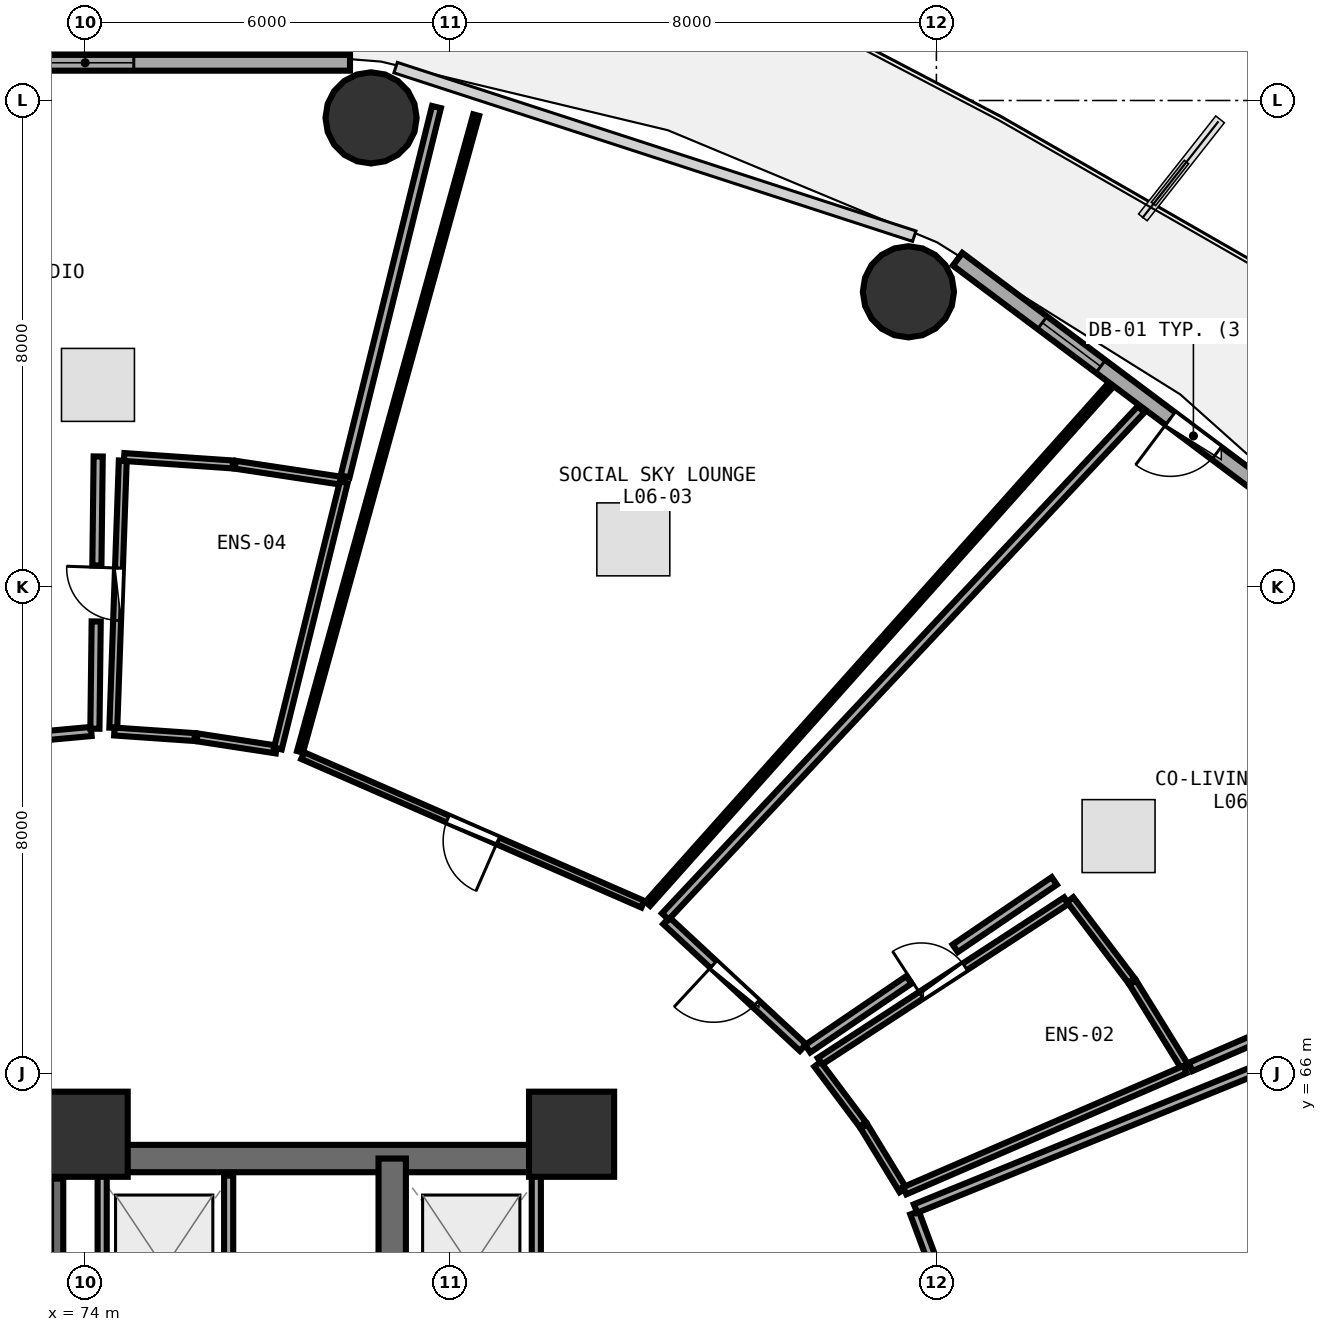
"""IFC4 building model, lengths in metres.
Left out: names, types, materials, properties, quantities, classifications, styles, units other than length and angle.
Written with IfcOpenShell. Run it as: python <this file> out.ifc"""

import sys

from ifc_helpers import new_model, si_unit, direction, frame, frame_2d, origin, origin_2d, place, context, subcontext, project, spatial, rectangle, circle, extrude, element, fill, save


model = new_model("IFC4")
c1 = context("Model", 3, precision=1e-05, world=origin(), true_north=direction((0.0, 1.0)))
c2 = subcontext(c1, "Body", "Model", "MODEL_VIEW")
j1 = project(units=[si_unit("LENGTHUNIT", "METRE"), si_unit("PLANEANGLEUNIT", "RADIAN")], contexts=[c1])
p1 = place(None, origin())
s1 = spatial("IfcSite", under=j1, at=p1, CompositionType="ELEMENT")
p2 = place(p1, origin())
s2 = spatial("IfcBuilding", under=s1, at=p2, CompositionType="ELEMENT")
p3 = place(p2, frame((0.0, 0.0, 26.25)))
s3 = spatial("IfcBuildingStorey", under=s2, at=p3, CompositionType="ELEMENT", Elevation=26.25)
for number, where, z_axis, x_axis in (
    (1, (82.0, 65.0, 0.0), (0.0, 0.0, 1.0), (1.0, 0.0, 0.0)),
    (2, (74.0, 65.0, 0.0), (0.0, 0.0, 1.0), (1.0, 0.0, 0.0)),
):
    element("IfcColumn", number, at=place(p3, frame(where, z_axis=z_axis, x_axis=x_axis)), inside=s3, PredefinedType="PILASTER", context=c2, shape_type="SweptSolid", body=[
        extrude(rectangle(XDim=1.4, YDim=1.4, at=origin_2d()), origin(), (0.0, 0.0, 1.0), 3.75),
    ])
for number, where, z_axis, x_axis in (
    (3, (87.54, 78.854, 0.0), (0.0, 0.0, 1.0), (1.0, 0.0, 0.0)),
    (4, (78.702, 81.714, 0.0), (0.0, 0.0, 1.0), (1.0, 0.0, 0.0)),
):
    element("IfcColumn", number, at=place(p3, frame(where, z_axis=z_axis, x_axis=x_axis)), inside=s3, PredefinedType="COLUMN", context=c2, shape_type="SweptSolid", body=[
        extrude(circle(Radius=0.75, at=origin_2d()), origin(), (0.0, 0.0, 1.0), 3.75),
    ])
p4 = place(p3, frame((94.984, 74.418, 0.0), z_axis=(0.0, 0.0, 1.0), x_axis=(-0.80030733173, 0.599590005569, 0.0)))
e5 = element("IfcWall", 5, at=p4, inside=s3, PredefinedType="SOLIDWALL", context=c2, shape_type="SweptSolid", body=[
    extrude(rectangle(XDim=8.291, YDim=0.26, at=frame_2d((4.145, 0.0))), origin(), (0.0, 0.0, 1.0), 3.475),
])
p5 = place(p4, frame((2.97, 0.0, 0.0)))
e6 = element("IfcOpeningElement", 6, at=p5, cuts=e5, PredefinedType="OPENING", context=c2, shape_type="SweptSolid", body=[
    extrude(rectangle(XDim=0.95, YDim=2.1, at=frame_2d((0.475, 1.05))), frame((0.0, 0.14, 0.0), z_axis=(0.0, -1.0, 0.0), x_axis=(1.0, 0.0, 0.0)), (0.0, 0.0, 1.0), 0.28),
])
p6 = place(p4, frame((5.35, 0.0, 0.85)))
e7 = element("IfcOpeningElement", 7, at=p6, cuts=e5, PredefinedType="OPENING", context=c2, shape_type="SweptSolid", body=[
    extrude(rectangle(XDim=1.2, YDim=1.45, at=frame_2d((0.6, 0.725))), frame((0.0, 0.14, 0.0), z_axis=(0.0, -1.0, 0.0), x_axis=(1.0, 0.0, 0.0)), (0.0, 0.0, 1.0), 0.28),
])
p7 = place(p3, frame((78.356, 82.62, 0.0), z_axis=(0.0, 0.0, 1.0), x_axis=(-1.0, 0.0, 0.0)))
e8 = element("IfcWall", 8, at=p7, inside=s3, PredefinedType="SOLIDWALL", context=c2, shape_type="SweptSolid", body=[
    extrude(rectangle(XDim=8.712, YDim=0.26, at=frame_2d((4.356, 0.0))), origin(), (0.0, 0.0, 1.0), 3.475),
])
p8 = place(p7, frame((3.556, 0.0, 0.85)))
e9 = element("IfcOpeningElement", 9, at=p8, cuts=e8, PredefinedType="OPENING", context=c2, shape_type="SweptSolid", body=[
    extrude(rectangle(XDim=1.6, YDim=1.45, at=frame_2d((0.8, 0.725))), frame((0.0, 0.14, 0.0), z_axis=(0.0, -1.0, 0.0), x_axis=(1.0, 0.0, 0.0)), (0.0, 0.0, 1.0), 0.28),
])
p9 = place(p3, frame((73.54, 61.2, 0.0), z_axis=(0.0, 0.0, 1.0), x_axis=(0.0, 1.0, 0.0)))
e10 = element("IfcWall", 10, at=p9, inside=s3, PredefinedType="SHEAR", context=c2, shape_type="SweptSolid", body=[
    extrude(rectangle(XDim=3.07, YDim=0.2, at=frame_2d((1.535, 0.0))), origin(), (0.0, 0.0, 1.0), 3.49),
])
p10 = place(p3, frame((74.0, 64.6, 0.0), z_axis=(0.0, 0.0, 1.0), x_axis=(1.0, 0.0, 0.0)))
e11 = element("IfcWall", 11, at=p10, inside=s3, PredefinedType="SHEAR", context=c2, shape_type="SweptSolid", body=[
    extrude(rectangle(XDim=8.0, YDim=0.45, at=frame_2d((4.0, 0.0))), origin(), (0.0, 0.0, 1.0), 3.49),
])
p11 = place(p3, frame((79.05, 58.3, 0.0), z_axis=(0.0, 0.0, 1.0), x_axis=(0.0, 1.0, 0.0)))
e12 = element("IfcWall", 12, at=p11, inside=s3, PredefinedType="SHEAR", context=c2, shape_type="SweptSolid", body=[
    extrude(rectangle(XDim=6.3, YDim=0.45, at=frame_2d((3.15, 0.0))), origin(), (0.0, 0.0, 1.0), 3.49),
])
p12 = place(p3, frame((74.28, 61.35, 0.0), z_axis=(0.0, 0.0, 1.0), x_axis=(0.0, 1.0, 0.0)))
e13 = element("IfcWall", 13, at=p12, inside=s3, PredefinedType="PARTITIONING", context=c2, shape_type="SweptSolid", body=[
    extrude(rectangle(XDim=2.97, YDim=0.15, at=frame_2d((1.485, 0.0))), origin(), (0.0, 0.0, 1.0), 3.48),
])
for number, where, z_axis, x_axis in (
    (14, (76.36, 61.48, 0.0), (0.0, 0.0, 1.0), (0.0, 1.0, 0.0)),
    (15, (81.42, 61.48, 0.0), (0.0, 0.0, 1.0), (0.0, 1.0, 0.0)),
):
    element("IfcWall", number, at=place(p3, frame(where, z_axis=z_axis, x_axis=x_axis)), inside=s3, PredefinedType="PARTITIONING", context=c2, shape_type="SweptSolid", body=[
        extrude(rectangle(XDim=2.84, YDim=0.15, at=frame_2d((1.42, 0.0))), origin(), (0.0, 0.0, 1.0), 3.48),
    ])
p13 = place(p3, frame((88.667, 60.948, 0.0), z_axis=(0.0, 0.0, 1.0), x_axis=(-0.348640514247, 0.937256524024, 0.0)))
e16 = element("IfcWall", 16, at=p13, inside=s3, PredefinedType="PARTITIONING", context=c2, shape_type="SweptSolid", body=[
    extrude(rectangle(XDim=2.943, YDim=0.15, at=frame_2d((1.472, 0.0))), origin(), (0.0, 0.0, 1.0), 3.48),
])
p14 = place(p13, frame((0.997, 0.0, 0.0)))
e17 = element("IfcOpeningElement", 17, at=p14, cuts=e16, PredefinedType="OPENING", context=c2, shape_type="SweptSolid", body=[
    extrude(rectangle(XDim=0.95, YDim=2.08, at=frame_2d((0.475, 1.04))), frame((0.0, 0.085, 0.0), z_axis=(0.0, -1.0, 0.0), x_axis=(1.0, 0.0, 0.0)), (0.0, 0.0, 1.0), 0.17),
])
p15 = place(p3, frame((86.083, 66.2, 0.0), z_axis=(0.0, 0.0, 1.0), x_axis=(0.837796261941, 0.545982988267, 0.0)))
e18 = element("IfcWall", 18, at=p15, inside=s3, PredefinedType="PLUMBINGWALL", context=c2, shape_type="SweptSolid", body=[
    extrude(rectangle(XDim=4.838, YDim=0.13, at=frame_2d((2.419, 0.0))), origin(), (0.0, 0.0, 1.0), 3.235),
])
p16 = place(p15, frame((1.989, 0.0, 0.0)))
e19 = element("IfcOpeningElement", 19, at=p16, cuts=e18, PredefinedType="OPENING", context=c2, shape_type="SweptSolid", body=[
    extrude(rectangle(XDim=0.86, YDim=2.05, at=frame_2d((0.43, 1.025))), frame((0.0, 0.075, 0.0), z_axis=(0.0, -1.0, 0.0), x_axis=(1.0, 0.0, 0.0)), (0.0, 0.0, 1.0), 0.15),
])
p17 = place(p3, frame((85.806, 66.425, 0.0), z_axis=(0.0, 0.0, 1.0), x_axis=(-0.7329267348, 0.680307578538, 0.0)))
e20 = element("IfcWall", 20, at=p17, inside=s3, PredefinedType="PARTITIONING", context=c2, shape_type="SweptSolid", body=[
    extrude(rectangle(XDim=3.067, YDim=0.15, at=frame_2d((1.533, 0.0))), origin(), (0.0, 0.0, 1.0), 2.875),
])
p18 = place(p17, frame((1.059, 0.0, 0.0)))
e21 = element("IfcOpeningElement", 21, at=p18, cuts=e20, PredefinedType="OPENING", context=c2, shape_type="SweptSolid", body=[
    extrude(rectangle(XDim=0.95, YDim=2.08, at=frame_2d((0.475, 1.04))), frame((0.0, 0.085, 0.0), z_axis=(0.0, -1.0, 0.0), x_axis=(1.0, 0.0, 0.0)), (0.0, 0.0, 1.0), 0.17),
])
p19 = place(p3, frame((83.172, 68.783, 0.0), z_axis=(0.0, 0.0, 1.0), x_axis=(-0.916419655578, 0.400218708797, 0.0)))
e22 = element("IfcWall", 22, at=p19, inside=s3, PredefinedType="PARTITIONING", context=c2, shape_type="SweptSolid", body=[
    extrude(rectangle(XDim=6.104, YDim=0.12, at=frame_2d((3.052, 0.0))), origin(), (0.0, 0.0, 1.0), 2.875),
])
p20 = place(p19, frame((2.602, 0.0, 0.0)))
e23 = element("IfcOpeningElement", 23, at=p20, cuts=e22, PredefinedType="OPENING", context=c2, shape_type="SweptSolid", body=[
    extrude(rectangle(XDim=0.9, YDim=2.08, at=frame_2d((0.45, 1.04))), frame((0.0, 0.07, 0.0), z_axis=(0.0, -1.0, 0.0), x_axis=(1.0, 0.0, 0.0)), (0.0, 0.0, 1.0), 0.14),
])
p21 = place(p3, frame((74.463, 71.684, 0.0), z_axis=(0.0, 0.0, 1.0), x_axis=(0.035428098094, 0.999372227884, 0.0)))
e24 = element("IfcWall", 24, at=p21, inside=s3, PredefinedType="PLUMBINGWALL", context=c2, shape_type="SweptSolid", body=[
    extrude(rectangle(XDim=4.396, YDim=0.13, at=frame_2d((2.198, 0.0))), origin(), (0.0, 0.0, 1.0), 3.175),
])
p22 = place(p21, frame((1.768, 0.0, 0.0)))
e25 = element("IfcOpeningElement", 25, at=p22, cuts=e24, PredefinedType="OPENING", context=c2, shape_type="SweptSolid", body=[
    extrude(rectangle(XDim=0.86, YDim=2.05, at=frame_2d((0.43, 1.025))), frame((0.0, 0.075, 0.0), z_axis=(0.0, -1.0, 0.0), x_axis=(1.0, 0.0, 0.0)), (0.0, 0.0, 1.0), 0.15),
])
p23 = place(p3, frame((74.1, 71.624, 0.0), z_axis=(0.0, 0.0, 1.0), x_axis=(-0.995822031417, -0.091315287572, 0.0)))
e26 = element("IfcWall", 26, at=p23, inside=s3, PredefinedType="PARTITIONING", context=c2, shape_type="SweptSolid", body=[
    extrude(rectangle(XDim=3.219, YDim=0.15, at=frame_2d((1.609, 0.0))), origin(), (0.0, 0.0, 1.0), 3.235),
])
p24 = place(p23, frame((1.135, 0.0, 0.0)))
e27 = element("IfcOpeningElement", 27, at=p24, cuts=e26, PredefinedType="OPENING", context=c2, shape_type="SweptSolid", body=[
    extrude(rectangle(XDim=0.95, YDim=2.08, at=frame_2d((0.475, 1.04))), frame((0.0, 0.085, 0.0), z_axis=(0.0, -1.0, 0.0), x_axis=(1.0, 0.0, 0.0)), (0.0, 0.0, 1.0), 0.17),
])
p25 = place(p3, frame((87.657, 63.778, 0.0), z_axis=(0.0, 0.0, 1.0), x_axis=(0.926333713065, 0.376703931542, 0.0)))
e28 = element("IfcWall", 28, at=p25, inside=s3, PredefinedType="PARTITIONING", context=c2, shape_type="SweptSolid", body=[
    extrude(rectangle(XDim=12.099, YDim=0.15, at=frame_2d((6.05, 0.0))), origin(), (0.0, 0.0, 1.0), 2.875),
])
p26 = place(p3, frame((87.451, 64.08, 0.0), z_axis=(0.0, 0.0, 1.0), x_axis=(-0.52146609248, 0.853272004928, 0.0)))
e29 = element("IfcWall", 29, at=p26, inside=s3, PredefinedType="PLUMBINGWALL", context=c2, shape_type="SweptSolid", body=[
    extrude(rectangle(XDim=1.228, YDim=0.13, at=frame_2d((0.614, 0.0))), origin(), (0.0, 0.0, 1.0), 3.48),
])
p27 = place(p3, frame((86.788, 65.161, 0.0), z_axis=(0.0, 0.0, 1.0), x_axis=(-0.600347056143, 0.79973959023, 0.0)))
e30 = element("IfcWall", 30, at=p27, inside=s3, PredefinedType="PLUMBINGWALL", context=c2, shape_type="SweptSolid", body=[
    extrude(rectangle(XDim=1.238, YDim=0.13, at=frame_2d((0.619, 0.0))), origin(), (0.0, 0.0, 1.0), 2.875),
])
p28 = place(p3, frame((90.199, 68.858, 0.0), z_axis=(0.0, 0.0, 1.0), x_axis=(0.60376191721, -0.797164692725, 0.0)))
e31 = element("IfcWall", 31, at=p28, inside=s3, PredefinedType="PLUMBINGWALL", context=c2, shape_type="SweptSolid", body=[
    extrude(rectangle(XDim=1.669, YDim=0.13, at=frame_2d((0.834, 0.0))), origin(), (0.0, 0.0, 1.0), 3.175),
])
p29 = place(p3, frame((91.229, 67.495, 0.0), z_axis=(0.0, 0.0, 1.0), x_axis=(0.525540089642, -0.850768837099, 0.0)))
e32 = element("IfcWall", 32, at=p29, inside=s3, PredefinedType="PLUMBINGWALL", context=c2, shape_type="SweptSolid", body=[
    extrude(rectangle(XDim=1.651, YDim=0.13, at=frame_2d((0.826, 0.0))), origin(), (0.0, 0.0, 1.0), 3.175),
])
p30 = place(p3, frame((92.09, 66.065, 0.0), z_axis=(0.0, 0.0, 1.0), x_axis=(-0.917797204715, -0.397049481826, 0.0)))
e33 = element("IfcWall", 33, at=p30, inside=s3, PredefinedType="PLUMBINGWALL", context=c2, shape_type="SweptSolid", body=[
    extrude(rectangle(XDim=5.023, YDim=0.13, at=frame_2d((2.511, 0.0))), origin(), (0.0, 0.0, 1.0), 2.875),
])
p31 = place(p3, frame((83.542, 68.581, 0.0), z_axis=(0.0, 0.0, 1.0), x_axis=(0.684261294523, 0.729236916796, 0.0)))
e34 = element("IfcWall", 34, at=p31, inside=s3, PredefinedType="PARTITIONING", context=c2, shape_type="SweptSolid", body=[
    extrude(rectangle(XDim=11.438, YDim=0.15, at=frame_2d((5.719, 0.0))), origin(), (0.0, 0.0, 1.0), 2.875),
])
p32 = place(p3, frame((98.574, 68.874, 0.0), z_axis=(0.0, 0.0, 1.0), x_axis=(-0.917736225937, -0.397190407239, 0.0)))
e35 = element("IfcWall", 35, at=p32, inside=s3, PredefinedType="PARTITIONING", context=c2, shape_type="SweptSolid", body=[
    extrude(rectangle(XDim=6.967, YDim=0.15, at=frame_2d((3.483, 0.0))), origin(), (0.0, 0.0, 1.0), 2.875),
])
p33 = place(p3, frame((89.939, 69.166, 0.0), z_axis=(0.0, 0.0, 1.0), x_axis=(-0.826811291248, -0.562479411769, 0.0)))
e36 = element("IfcWall", 36, at=p33, inside=s3, PredefinedType="PARTITIONING", context=c2, shape_type="SweptSolid", body=[
    extrude(rectangle(XDim=1.971, YDim=0.15, at=frame_2d((0.985, 0.0))), origin(), (0.0, 0.0, 1.0), 3.48),
])
p34 = place(p3, frame((87.549, 67.539, 0.0), z_axis=(0.0, 0.0, 1.0), x_axis=(-0.826867883695, -0.562396215237, 0.0)))
e37 = element("IfcWall", 37, at=p34, inside=s3, PredefinedType="PARTITIONING", context=c2, shape_type="SweptSolid", body=[
    extrude(rectangle(XDim=2.014, YDim=0.15, at=frame_2d((1.007, 0.0))), origin(), (0.0, 0.0, 1.0), 3.235),
])
p35 = place(p3, frame((77.534, 71.289, 0.0), z_axis=(0.0, 0.0, 1.0), x_axis=(0.26671307518, 0.963775977875, 0.0)))
e38 = element("IfcWall", 38, at=p35, inside=s3, PredefinedType="PARTITIONING", context=c2, shape_type="SweptSolid", body=[
    extrude(rectangle(XDim=10.865, YDim=0.1, at=frame_2d((5.432, 0.0))), origin(), (0.0, 0.0, 1.0), 2.875),
])
p36 = place(p3, frame((90.844, 77.294, 0.0), z_axis=(0.0, 0.0, 1.0), x_axis=(-0.66580890104, -0.746122313897, 0.0)))
e39 = element("IfcWall", 39, at=p36, inside=s3, PredefinedType="PARTITIONING", context=c2, shape_type="SweptSolid", body=[
    extrude(rectangle(XDim=11.399, YDim=0.1, at=frame_2d((5.7, 0.0))), origin(), (0.0, 0.0, 1.0), 2.875),
])
p37 = place(p3, frame((77.145, 71.327, 0.0), z_axis=(0.0, 0.0, 1.0), x_axis=(-0.988427236939, 0.151695739152, 0.0)))
e40 = element("IfcWall", 40, at=p37, inside=s3, PredefinedType="PLUMBINGWALL", context=c2, shape_type="SweptSolid", body=[
    extrude(rectangle(XDim=1.32, YDim=0.13, at=frame_2d((0.66, 0.0))), origin(), (0.0, 0.0, 1.0), 3.235),
])
p38 = place(p3, frame((75.801, 71.531, 0.0), z_axis=(0.0, 0.0, 1.0), x_axis=(-0.997629018134, 0.068821088175, 0.0)))
e41 = element("IfcWall", 41, at=p38, inside=s3, PredefinedType="PLUMBINGWALL", context=c2, shape_type="SweptSolid", body=[
    extrude(rectangle(XDim=1.323, YDim=0.13, at=frame_2d((0.662, 0.0))), origin(), (0.0, 0.0, 1.0), 3.48),
])
p39 = place(p3, frame((74.641, 76.137, 0.0), z_axis=(0.0, 0.0, 1.0), x_axis=(0.997667905772, -0.06825503493, 0.0)))
e42 = element("IfcWall", 42, at=p39, inside=s3, PredefinedType="PLUMBINGWALL", context=c2, shape_type="SweptSolid", body=[
    extrude(rectangle(XDim=1.792, YDim=0.13, at=frame_2d((0.896, 0.0))), origin(), (0.0, 0.0, 1.0), 3.48),
])
p40 = place(p3, frame((76.469, 76.01, 0.0), z_axis=(0.0, 0.0, 1.0), x_axis=(0.988799846431, -0.14924765894, 0.0)))
e43 = element("IfcWall", 43, at=p40, inside=s3, PredefinedType="PLUMBINGWALL", context=c2, shape_type="SweptSolid", body=[
    extrude(rectangle(XDim=1.79, YDim=0.13, at=frame_2d((0.895, 0.0))), origin(), (0.0, 0.0, 1.0), 3.48),
])
p41 = place(p3, frame((78.253, 75.721, 0.0), z_axis=(0.0, 0.0, 1.0), x_axis=(-0.240229117536, -0.970716215528, 0.0)))
e44 = element("IfcWall", 44, at=p41, inside=s3, PredefinedType="PLUMBINGWALL", context=c2, shape_type="SweptSolid", body=[
    extrude(rectangle(XDim=4.509, YDim=0.13, at=frame_2d((2.255, 0.0))), origin(), (0.0, 0.0, 1.0), 3.175),
])
p42 = place(p3, frame((79.777, 81.892, 0.0), z_axis=(0.0, 0.0, 1.0), x_axis=(-0.240000910349, -0.970772662899, 0.0)))
e45 = element("IfcWall", 45, at=p42, inside=s3, PredefinedType="PARTITIONING", context=c2, shape_type="SweptSolid", body=[
    extrude(rectangle(XDim=6.257, YDim=0.15, at=frame_2d((3.128, 0.0))), origin(), (0.0, 0.0, 1.0), 2.875),
])
p43 = place(p3, frame((74.215, 76.146, 0.0), z_axis=(0.0, 0.0, 1.0), x_axis=(-0.012119496596, -0.999926556204, 0.0)))
e46 = element("IfcWall", 46, at=p43, inside=s3, PredefinedType="PARTITIONING", context=c2, shape_type="SweptSolid", body=[
    extrude(rectangle(XDim=1.793, YDim=0.15, at=frame_2d((0.896, 0.0))), origin(), (0.0, 0.0, 1.0), 3.175),
])
p44 = place(p3, frame((74.182, 73.433, 0.0), z_axis=(0.0, 0.0, 1.0), x_axis=(-0.01217734225, -0.999925853419, 0.0)))
e47 = element("IfcWall", 47, at=p44, inside=s3, PredefinedType="PARTITIONING", context=c2, shape_type="SweptSolid", body=[
    extrude(rectangle(XDim=1.764, YDim=0.15, at=frame_2d((0.882, 0.0))), origin(), (0.0, 0.0, 1.0), 3.48),
])
p45 = place(p5, frame((0.95, 0.0, 0.0), z_axis=(0.0, 0.0, 1.0), x_axis=(-1.0, 0.0, 0.0)))
e48 = element("IfcDoor", 48, at=p45, inside=s3, OperationType="SINGLE_SWING_LEFT", PredefinedType="DOOR", context=c2, shape_type="SweptSolid", body=[
    extrude(rectangle(XDim=0.95, YDim=2.1, at=frame_2d((0.475, 1.05))), frame((0.0, 0.025, 0.0), z_axis=(0.0, -1.0, 0.0), x_axis=(1.0, 0.0, 0.0)), (0.0, 0.0, 1.0), 0.05),
])
fill(e6, e48)
p46 = place(p6, origin())
e49 = element("IfcWindow", 49, at=p46, inside=s3, PartitioningType="SINGLE_PANEL", PredefinedType="WINDOW", context=c2, shape_type="SweptSolid", body=[
    extrude(rectangle(XDim=1.2, YDim=1.45, at=frame_2d((0.6, 0.725))), frame((0.0, 0.03, 0.0), z_axis=(0.0, -1.0, 0.0), x_axis=(1.0, 0.0, 0.0)), (0.0, 0.0, 1.0), 0.06),
])
fill(e7, e49)
p47 = place(p8, origin())
e50 = element("IfcWindow", 50, at=p47, inside=s3, PartitioningType="SINGLE_PANEL", PredefinedType="WINDOW", context=c2, shape_type="SweptSolid", body=[
    extrude(rectangle(XDim=1.6, YDim=1.45, at=frame_2d((0.8, 0.725))), frame((0.0, 0.03, 0.0), z_axis=(0.0, -1.0, 0.0), x_axis=(1.0, 0.0, 0.0)), (0.0, 0.0, 1.0), 0.06),
])
fill(e9, e50)
p48 = place(p16, origin())
e51 = element("IfcDoor", 51, at=p48, inside=s3, OperationType="SINGLE_SWING_LEFT", PredefinedType="DOOR", context=c2, shape_type="SweptSolid", body=[
    extrude(rectangle(XDim=0.86, YDim=2.05, at=frame_2d((0.43, 1.025))), frame((0.0, 0.025, 0.0), z_axis=(0.0, -1.0, 0.0), x_axis=(1.0, 0.0, 0.0)), (0.0, 0.0, 1.0), 0.05),
])
fill(e19, e51)
p49 = place(p18, origin())
e52 = element("IfcDoor", 52, at=p49, inside=s3, OperationType="SINGLE_SWING_RIGHT", PredefinedType="DOOR", context=c2, shape_type="SweptSolid", body=[
    extrude(rectangle(XDim=0.95, YDim=2.08, at=frame_2d((0.475, 1.04))), frame((0.0, 0.025, 0.0), z_axis=(0.0, -1.0, 0.0), x_axis=(1.0, 0.0, 0.0)), (0.0, 0.0, 1.0), 0.05),
])
fill(e21, e52)
p50 = place(p20, origin())
e53 = element("IfcDoor", 53, at=p50, inside=s3, OperationType="SINGLE_SWING_LEFT", PredefinedType="DOOR", context=c2, shape_type="SweptSolid", body=[
    extrude(rectangle(XDim=0.9, YDim=2.08, at=frame_2d((0.45, 1.04))), frame((0.0, 0.025, 0.0), z_axis=(0.0, -1.0, 0.0), x_axis=(1.0, 0.0, 0.0)), (0.0, 0.0, 1.0), 0.05),
])
fill(e23, e53)
p51 = place(p22, origin())
e54 = element("IfcDoor", 54, at=p51, inside=s3, OperationType="SINGLE_SWING_RIGHT", PredefinedType="DOOR", context=c2, shape_type="SweptSolid", body=[
    extrude(rectangle(XDim=0.86, YDim=2.05, at=frame_2d((0.43, 1.025))), frame((0.0, 0.025, 0.0), z_axis=(0.0, -1.0, 0.0), x_axis=(1.0, 0.0, 0.0)), (0.0, 0.0, 1.0), 0.05),
])
fill(e25, e54)
save(model, sys.argv[1])
